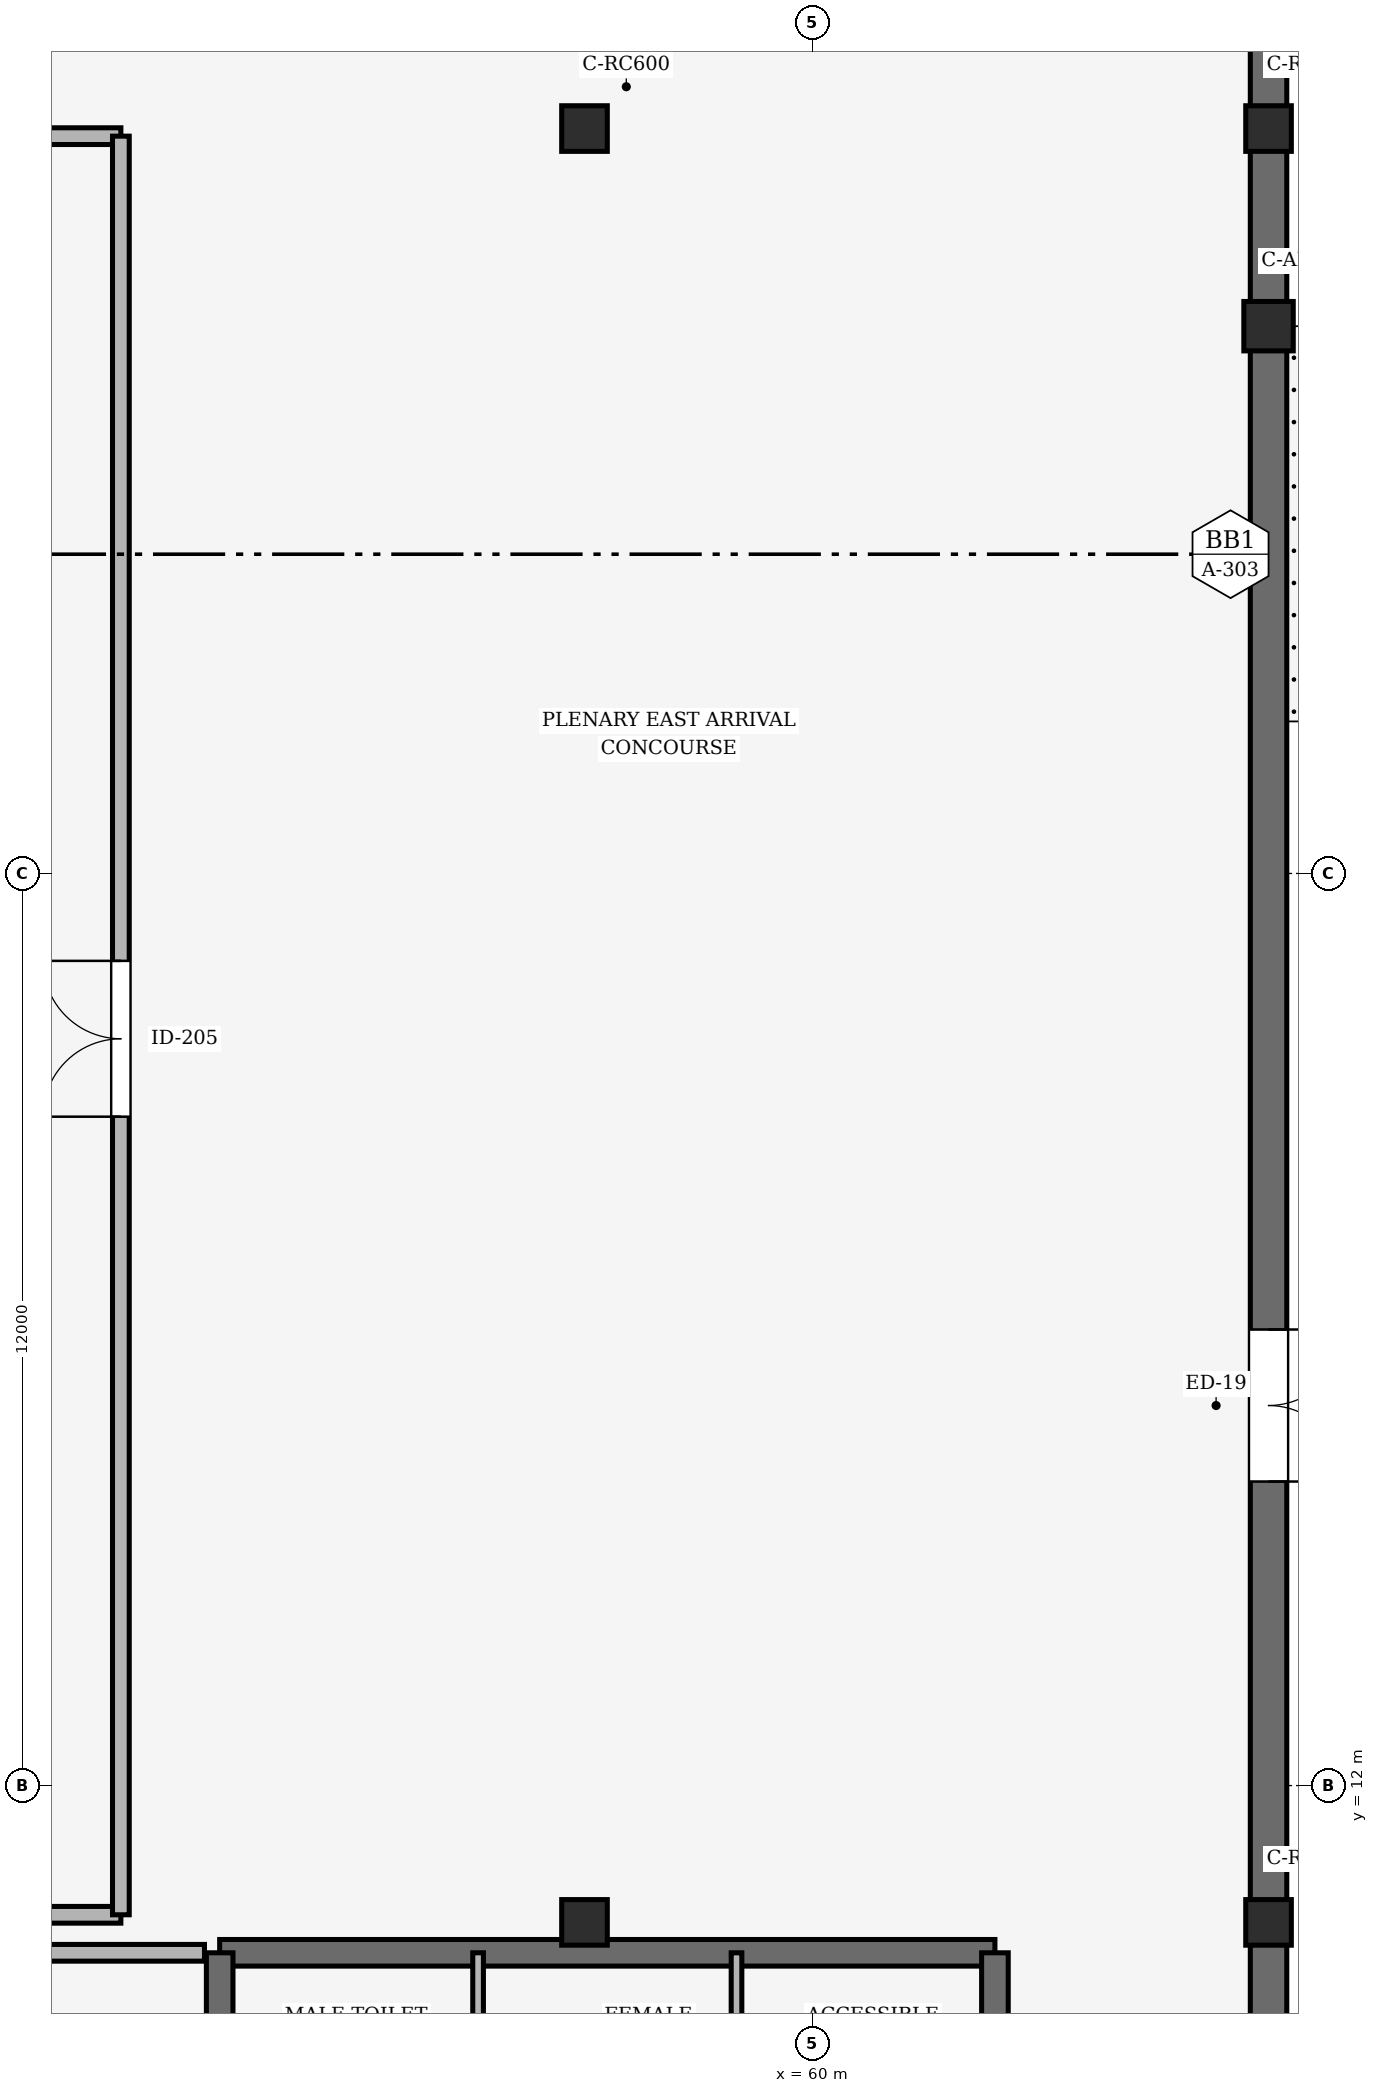
"""IFC4 building model, lengths in metres.
Left out: names, types, materials, properties, quantities, classifications, styles, units other than length and angle.
Written with IfcOpenShell. Run it as: python <this file> out.ifc"""

import sys

from ifc_helpers import new_model, si_unit, direction, frame, frame_2d, origin, origin_2d, place, context, subcontext, project, spatial, rectangle, circle, extrude, element, fill, save


model = new_model("IFC4")
c1 = context("Model", 3, precision=1e-05, world=origin(), true_north=direction((0.0, 1.0)))
c2 = subcontext(c1, "Body", "Model", "MODEL_VIEW")
j1 = project(units=[si_unit("LENGTHUNIT", "METRE"), si_unit("PLANEANGLEUNIT", "RADIAN")], contexts=[c1])
p1 = place(None, origin())
s1 = spatial("IfcSite", under=j1, at=p1, CompositionType="ELEMENT")
p2 = place(p1, origin())
s2 = spatial("IfcBuilding", under=s1, at=p2, CompositionType="ELEMENT")
p3 = place(p2, origin())
s3 = spatial("IfcBuildingStorey", under=s2, at=p3, CompositionType="ELEMENT", Elevation=0.0)
for number, where, z_axis, x_axis in (
    (1, (57.0, 10.2, -0.44), (0.0, 0.0, 1.0), (1.0, 0.0, 0.0)),
    (2, (57.0, 33.8, -0.44), (0.0, 0.0, 1.0), (1.0, 0.0, 0.0)),
    (3, (66.0, 10.2, -0.44), (0.0, 0.0, 1.0), (1.0, 0.0, 0.0)),
    (4, (66.0, 33.8, -0.44), (0.0, 0.0, 1.0), (1.0, 0.0, 0.0)),
):
    element("IfcColumn", number, at=place(p3, frame(where, z_axis=z_axis, x_axis=x_axis)), inside=s3, PredefinedType="COLUMN", context=c2, shape_type="SweptSolid", body=[
        extrude(rectangle(XDim=0.6, YDim=0.6, at=origin_2d()), origin(), (0.0, 0.0, 1.0), 5.84),
    ])
p4 = place(p3, frame((66.0, 31.2, -0.44), z_axis=(0.0, 0.0, 1.0), x_axis=(1.0, 0.0, 0.0)))
e5 = element("IfcColumn", 5, at=p4, inside=s3, PredefinedType="COLUMN", context=c2, shape_type="SweptSolid", body=[
    extrude(circle(Radius=0.325, at=origin_2d()), origin(), (0.0, 0.0, 1.0), 5.24),
])
p5 = place(p3, frame((66.0, 0.0, 0.0), z_axis=(0.0, 0.0, 1.0), x_axis=(0.0, 1.0, 0.0)))
e6 = element("IfcWall", 6, at=p5, inside=s3, PredefinedType="SOLIDWALL", context=c2, shape_type="SweptSolid", body=[
    extrude(rectangle(XDim=36.0, YDim=0.48, at=frame_2d((18.0, 0.0))), origin(), (0.0, 0.0, 1.0), 4.65),
])
p6 = place(p5, frame((16.0, 0.0, 0.0)))
e7 = element("IfcOpeningElement", 7, at=p6, cuts=e6, PredefinedType="OPENING", context=c2, shape_type="SweptSolid", body=[
    extrude(rectangle(XDim=2.0, YDim=2.4, at=frame_2d((1.0, 1.2))), frame((0.0, 0.25, 0.0), z_axis=(0.0, -1.0, 0.0), x_axis=(1.0, 0.0, 0.0)), (0.0, 0.0, 1.0), 0.5),
])
p7 = place(p3, frame((62.4, 9.8, 0.0), z_axis=(0.0, 0.0, 1.0), x_axis=(-1.0, 0.0, 0.0)))
e8 = element("IfcWall", 8, at=p7, inside=s3, PredefinedType="SHEAR", context=c2, shape_type="SweptSolid", body=[
    extrude(rectangle(XDim=10.2, YDim=0.35, at=frame_2d((5.1, 0.0))), origin(), (0.0, 0.0, 1.0), 5.4),
])
p8 = place(p3, frame((52.2, 9.8, 0.0), z_axis=(0.0, 0.0, 1.0), x_axis=(0.0, -1.0, 0.0)))
e9 = element("IfcWall", 9, at=p8, inside=s3, PredefinedType="SHEAR", context=c2, shape_type="SweptSolid", body=[
    extrude(rectangle(XDim=8.4, YDim=0.35, at=frame_2d((4.2, 0.0))), origin(), (0.0, 0.0, 1.0), 5.4),
])
p9 = place(p8, frame((2.95, 0.0, 0.0)))
e10 = element("IfcOpeningElement", 10, at=p9, cuts=e9, PredefinedType="OPENING", context=c2, shape_type="SweptSolid", body=[
    extrude(rectangle(XDim=1.15, YDim=2.15, at=frame_2d((0.575, 1.075))), frame((0.0, 0.185, 0.0), z_axis=(0.0, -1.0, 0.0), x_axis=(1.0, 0.0, 0.0)), (0.0, 0.0, 1.0), 0.37),
])
p10 = place(p3, frame((62.4, 1.4, 0.0), z_axis=(0.0, 0.0, 1.0), x_axis=(0.0, 1.0, 0.0)))
e11 = element("IfcWall", 11, at=p10, inside=s3, PredefinedType="SHEAR", context=c2, shape_type="SweptSolid", body=[
    extrude(rectangle(XDim=8.4, YDim=0.35, at=frame_2d((4.2, 0.0))), origin(), (0.0, 0.0, 1.0), 5.4),
])
for number, where, z_axis, x_axis in (
    (12, (55.6, 7.4, 0.0), (0.0, 0.0, 1.0), (0.0, 1.0, 0.0)),
    (13, (59.0, 7.4, 0.0), (0.0, 0.0, 1.0), (0.0, 1.0, 0.0)),
):
    element("IfcWall", number, at=place(p3, frame(where, z_axis=z_axis, x_axis=x_axis)), inside=s3, PredefinedType="PARTITIONING", context=c2, shape_type="SweptSolid", body=[
        extrude(rectangle(XDim=2.4, YDim=0.14, at=frame_2d((1.2, 0.0))), origin(), (0.0, 0.0, 1.0), 4.5),
    ])
p11 = place(p3, frame((49.1, 9.8, 0.0), z_axis=(0.0, 0.0, 1.0), x_axis=(1.0, 0.0, 0.0)))
e14 = element("IfcWall", 14, at=p11, inside=s3, PredefinedType="SOLIDWALL", context=c2, shape_type="SweptSolid", body=[
    extrude(rectangle(XDim=2.9, YDim=0.22, at=frame_2d((1.45, 0.0))), origin(), (0.0, 0.0, 1.0), 4.6),
])
p12 = place(p3, frame((15.1, 10.3, 0.0), z_axis=(0.0, 0.0, 1.0), x_axis=(1.0, 0.0, 0.0)))
e15 = element("IfcWall", 15, at=p12, inside=s3, PredefinedType="SOLIDWALL", context=c2, shape_type="SweptSolid", body=[
    extrude(rectangle(XDim=35.8, YDim=0.22, at=frame_2d((17.9, 0.0))), origin(), (0.0, 0.0, 1.0), 4.1),
])
p13 = place(p12, frame((9.4, 0.0, 0.0)))
e16 = element("IfcOpeningElement", 16, at=p13, cuts=e15, PredefinedType="OPENING", context=c2, shape_type="SweptSolid", body=[
    extrude(rectangle(XDim=2.05, YDim=2.3, at=frame_2d((1.025, 1.15))), frame((0.0, 0.12, 0.0), z_axis=(0.0, -1.0, 0.0), x_axis=(1.0, 0.0, 0.0)), (0.0, 0.0, 1.0), 0.24),
])
p14 = place(p12, frame((27.4, 0.0, 0.0)))
e17 = element("IfcOpeningElement", 17, at=p14, cuts=e15, PredefinedType="OPENING", context=c2, shape_type="SweptSolid", body=[
    extrude(rectangle(XDim=2.05, YDim=2.3, at=frame_2d((1.025, 1.15))), frame((0.0, 0.12, 0.0), z_axis=(0.0, -1.0, 0.0), x_axis=(1.0, 0.0, 0.0)), (0.0, 0.0, 1.0), 0.24),
])
p15 = place(p3, frame((50.9, 33.7, 0.0), z_axis=(0.0, 0.0, 1.0), x_axis=(-1.0, 0.0, 0.0)))
e18 = element("IfcWall", 18, at=p15, inside=s3, PredefinedType="SOLIDWALL", context=c2, shape_type="SweptSolid", body=[
    extrude(rectangle(XDim=35.8, YDim=0.22, at=frame_2d((17.9, 0.0))), origin(), (0.0, 0.0, 1.0), 4.1),
])
p16 = place(p15, frame((15.35, 0.0, 0.0)))
e19 = element("IfcOpeningElement", 19, at=p16, cuts=e18, PredefinedType="OPENING", context=c2, shape_type="SweptSolid", body=[
    extrude(rectangle(XDim=2.05, YDim=2.3, at=frame_2d((1.025, 1.15))), frame((0.0, 0.12, 0.0), z_axis=(0.0, -1.0, 0.0), x_axis=(1.0, 0.0, 0.0)), (0.0, 0.0, 1.0), 0.24),
])
p17 = place(p15, frame((24.35, 0.0, 0.0)))
e20 = element("IfcOpeningElement", 20, at=p17, cuts=e18, PredefinedType="OPENING", context=c2, shape_type="SweptSolid", body=[
    extrude(rectangle(XDim=2.05, YDim=2.3, at=frame_2d((1.025, 1.15))), frame((0.0, 0.12, 0.0), z_axis=(0.0, -1.0, 0.0), x_axis=(1.0, 0.0, 0.0)), (0.0, 0.0, 1.0), 0.24),
])
p18 = place(p3, frame((50.9, 10.3, 0.0), z_axis=(0.0, 0.0, 1.0), x_axis=(0.0, 1.0, 0.0)))
e21 = element("IfcWall", 21, at=p18, inside=s3, PredefinedType="SOLIDWALL", context=c2, shape_type="SweptSolid", body=[
    extrude(rectangle(XDim=23.4, YDim=0.22, at=frame_2d((11.7, 0.0))), origin(), (0.0, 0.0, 1.0), 4.1),
])
p19 = place(p18, frame((10.5, 0.0, 0.0)))
e22 = element("IfcOpeningElement", 22, at=p19, cuts=e21, PredefinedType="OPENING", context=c2, shape_type="SweptSolid", body=[
    extrude(rectangle(XDim=2.05, YDim=2.3, at=frame_2d((1.025, 1.15))), frame((0.0, 0.12, 0.0), z_axis=(0.0, -1.0, 0.0), x_axis=(1.0, 0.0, 0.0)), (0.0, 0.0, 1.0), 0.24),
])
p20 = place(p6, frame((2.0, 0.0, 0.0), z_axis=(0.0, 0.0, 1.0), x_axis=(-1.0, 0.0, 0.0)))
e23 = element("IfcDoor", 23, at=p20, inside=s3, OperationType="DOUBLE_DOOR_SINGLE_SWING", PredefinedType="DOOR", context=c2, shape_type="SweptSolid", body=[
    extrude(rectangle(XDim=2.0, YDim=2.4, at=frame_2d((1.0, 1.2))), frame((0.0, 0.025, 0.0), z_axis=(0.0, -1.0, 0.0), x_axis=(1.0, 0.0, 0.0)), (0.0, 0.0, 1.0), 0.05),
])
fill(e7, e23)
p21 = place(p19, origin())
e24 = element("IfcDoor", 24, at=p21, inside=s3, OperationType="DOUBLE_DOOR_SINGLE_SWING", PredefinedType="DOOR", context=c2, shape_type="SweptSolid", body=[
    extrude(rectangle(XDim=2.05, YDim=2.3, at=frame_2d((1.025, 1.15))), frame((0.0, 0.025, 0.0), z_axis=(0.0, -1.0, 0.0), x_axis=(1.0, 0.0, 0.0)), (0.0, 0.0, 1.0), 0.05),
])
fill(e22, e24)
save(model, sys.argv[1])
